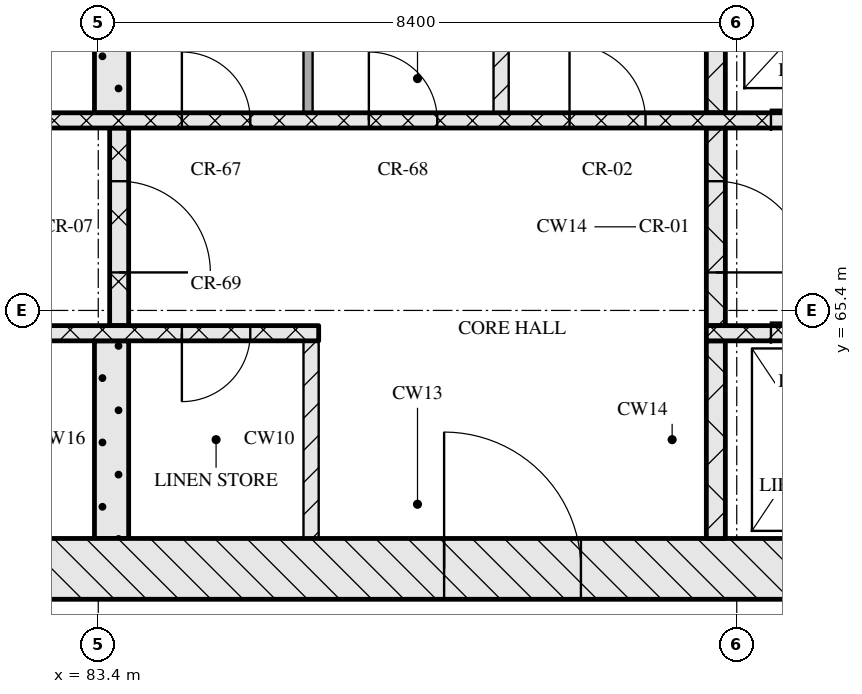
"""IFC4 building model, lengths in metres.
Left out: names, types, materials, properties, quantities, classifications, styles, units other than length and angle.
Written with IfcOpenShell. Run it as: python <this file> out.ifc"""

import sys

from ifc_helpers import new_model, si_unit, direction, frame, frame_2d, origin, place, context, subcontext, project, spatial, rectangle, extrude, element, fill, save


model = new_model("IFC4")
c1 = context("Model", 3, precision=1e-05, world=origin(), true_north=direction((0.0, 1.0)))
c2 = subcontext(c1, "Body", "Model", "MODEL_VIEW")
j1 = project(units=[si_unit("LENGTHUNIT", "METRE"), si_unit("PLANEANGLEUNIT", "RADIAN")], contexts=[c1])
p1 = place(None, origin())
s1 = spatial("IfcSite", under=j1, at=p1, CompositionType="ELEMENT")
p2 = place(p1, origin())
s2 = spatial("IfcBuilding", under=s1, at=p2, CompositionType="ELEMENT")
p3 = place(p2, frame((0.0, 0.0, 183.45)))
s3 = spatial("IfcBuildingStorey", under=s2, at=p3, CompositionType="ELEMENT", Elevation=183.45)
p4 = place(p3, frame((67.0, 62.0, 0.0), z_axis=(0.0, 0.0, 1.0), x_axis=(1.0, 0.0, 0.0)))
e1 = element("IfcWall", 1, at=p4, inside=s3, PredefinedType="SOLIDWALL", context=c2, shape_type="SweptSolid", body=[
    extrude(rectangle(XDim=41.2, YDim=0.8, at=frame_2d((20.6, 0.0))), origin(), (0.0, 0.0, 1.0), 3.32),
])
p5 = place(p4, frame((20.95, 0.0, 0.0)))
e2 = element("IfcOpeningElement", 2, at=p5, cuts=e1, PredefinedType="OPENING", context=c2, shape_type="SweptSolid", body=[
    extrude(rectangle(XDim=1.8, YDim=2.1, at=frame_2d((0.9, 1.05))), frame((0.0, 0.41, 0.0), z_axis=(0.0, -1.0, 0.0), x_axis=(1.0, 0.0, 0.0)), (0.0, 0.0, 1.0), 0.82),
])
p6 = place(p3, frame((83.575, 62.4, 0.0), z_axis=(0.0, 0.0, 1.0), x_axis=(0.0, 1.0, 0.0)))
e3 = element("IfcWall", 3, at=p6, inside=s3, PredefinedType="SOLIDWALL", context=c2, shape_type="SweptSolid", body=[
    extrude(rectangle(XDim=2.6, YDim=0.45, at=frame_2d((1.3, 0.0))), origin(), (0.0, 0.0, 1.0), 3.32),
])
p7 = place(p3, frame((86.2, 62.4, 0.0), z_axis=(0.0, 0.0, 1.0), x_axis=(0.0, 1.0, 0.0)))
e4 = element("IfcWall", 4, at=p7, inside=s3, PredefinedType="PARTITIONING", context=c2, shape_type="SweptSolid", body=[
    extrude(rectangle(XDim=2.6, YDim=0.2, at=frame_2d((1.3, 0.0))), origin(), (0.0, 0.0, 1.0), 3.32),
])
p8 = place(p3, frame((91.525, 62.4, 0.0), z_axis=(0.0, 0.0, 1.0), x_axis=(0.0, 1.0, 0.0)))
e5 = element("IfcWall", 5, at=p8, inside=s3, PredefinedType="SOLIDWALL", context=c2, shape_type="SweptSolid", body=[
    extrude(rectangle(XDim=2.6, YDim=0.25, at=frame_2d((1.3, 0.0))), origin(), (0.0, 0.0, 1.0), 3.32),
])
p9 = place(p3, frame((67.8, 65.1, 0.0), z_axis=(0.0, 0.0, 1.0), x_axis=(1.0, 0.0, 0.0)))
e6 = element("IfcWall", 6, at=p9, inside=s3, PredefinedType="SOLIDWALL", context=c2, shape_type="SweptSolid", body=[
    extrude(rectangle(XDim=18.5, YDim=0.2, at=frame_2d((9.25, 0.0))), origin(), (0.0, 0.0, 1.0), 3.32),
])
p10 = place(p9, frame((7.27, 0.0, 0.0)))
e7 = element("IfcOpeningElement", 7, at=p10, cuts=e6, PredefinedType="OPENING", context=c2, shape_type="SweptSolid", body=[
    extrude(rectangle(XDim=0.9, YDim=2.1, at=frame_2d((0.45, 1.05))), frame((0.0, 0.11, 0.0), z_axis=(0.0, -1.0, 0.0), x_axis=(1.0, 0.0, 0.0)), (0.0, 0.0, 1.0), 0.22),
])
p11 = place(p9, frame((9.65, 0.0, 0.0)))
e8 = element("IfcOpeningElement", 8, at=p11, cuts=e6, PredefinedType="OPENING", context=c2, shape_type="SweptSolid", body=[
    extrude(rectangle(XDim=0.9, YDim=2.1, at=frame_2d((0.45, 1.05))), frame((0.0, 0.11, 0.0), z_axis=(0.0, -1.0, 0.0), x_axis=(1.0, 0.0, 0.0)), (0.0, 0.0, 1.0), 0.22),
])
p12 = place(p9, frame((13.36, 0.0, 0.0)))
e9 = element("IfcOpeningElement", 9, at=p12, cuts=e6, PredefinedType="OPENING", context=c2, shape_type="SweptSolid", body=[
    extrude(rectangle(XDim=0.9, YDim=2.1, at=frame_2d((0.45, 1.05))), frame((0.0, 0.11, 0.0), z_axis=(0.0, -1.0, 0.0), x_axis=(1.0, 0.0, 0.0)), (0.0, 0.0, 1.0), 0.22),
])
p13 = place(p9, frame((16.7, 0.0, 0.0)))
e10 = element("IfcOpeningElement", 10, at=p13, cuts=e6, PredefinedType="OPENING", context=c2, shape_type="SweptSolid", body=[
    extrude(rectangle(XDim=0.9, YDim=2.1, at=frame_2d((0.45, 1.05))), frame((0.0, 0.11, 0.0), z_axis=(0.0, -1.0, 0.0), x_axis=(1.0, 0.0, 0.0)), (0.0, 0.0, 1.0), 0.22),
])
p14 = place(p3, frame((91.4, 65.1, 0.0), z_axis=(0.0, 0.0, 1.0), x_axis=(1.0, 0.0, 0.0)))
e11 = element("IfcWall", 11, at=p14, inside=s3, PredefinedType="SOLIDWALL", context=c2, shape_type="SweptSolid", body=[
    extrude(rectangle(XDim=16.0, YDim=0.2, at=frame_2d((8.0, 0.0))), origin(), (0.0, 0.0, 1.0), 3.32),
])
p15 = place(p14, frame((0.85, 0.0, 0.0)))
e12 = element("IfcOpeningElement", 12, at=p15, cuts=e11, PredefinedType="OPENING", context=c2, shape_type="SweptSolid", body=[
    extrude(rectangle(XDim=1.1, YDim=2.1, at=frame_2d((0.55, 1.05))), frame((0.0, 0.11, 0.0), z_axis=(0.0, -1.0, 0.0), x_axis=(1.0, 0.0, 0.0)), (0.0, 0.0, 1.0), 0.22),
])
p16 = place(p14, frame((3.35, 0.0, 0.0)))
e13 = element("IfcOpeningElement", 13, at=p16, cuts=e11, PredefinedType="OPENING", context=c2, shape_type="SweptSolid", body=[
    extrude(rectangle(XDim=1.1, YDim=2.1, at=frame_2d((0.55, 1.05))), frame((0.0, 0.11, 0.0), z_axis=(0.0, -1.0, 0.0), x_axis=(1.0, 0.0, 0.0)), (0.0, 0.0, 1.0), 0.22),
])
p17 = place(p14, frame((5.85, 0.0, 0.0)))
e14 = element("IfcOpeningElement", 14, at=p17, cuts=e11, PredefinedType="OPENING", context=c2, shape_type="SweptSolid", body=[
    extrude(rectangle(XDim=1.1, YDim=2.1, at=frame_2d((0.55, 1.05))), frame((0.0, 0.11, 0.0), z_axis=(0.0, -1.0, 0.0), x_axis=(1.0, 0.0, 0.0)), (0.0, 0.0, 1.0), 0.22),
])
p18 = place(p14, frame((7.83, 0.0, 0.0)))
e15 = element("IfcOpeningElement", 15, at=p18, cuts=e11, PredefinedType="OPENING", context=c2, shape_type="SweptSolid", body=[
    extrude(rectangle(XDim=0.9, YDim=2.1, at=frame_2d((0.45, 1.05))), frame((0.0, 0.11, 0.0), z_axis=(0.0, -1.0, 0.0), x_axis=(1.0, 0.0, 0.0)), (0.0, 0.0, 1.0), 0.22),
])
p19 = place(p3, frame((83.675, 65.2, 0.0), z_axis=(0.0, 0.0, 1.0), x_axis=(0.0, 1.0, 0.0)))
e16 = element("IfcWall", 16, at=p19, inside=s3, PredefinedType="SOLIDWALL", context=c2, shape_type="SweptSolid", body=[
    extrude(rectangle(XDim=2.6, YDim=0.25, at=frame_2d((1.3, 0.0))), origin(), (0.0, 0.0, 1.0), 3.32),
])
p20 = place(p19, frame((0.7, 0.0, 0.0)))
e17 = element("IfcOpeningElement", 17, at=p20, cuts=e16, PredefinedType="OPENING", context=c2, shape_type="SweptSolid", body=[
    extrude(rectangle(XDim=1.2, YDim=2.1, at=frame_2d((0.6, 1.05))), frame((0.0, 0.135, 0.0), z_axis=(0.0, -1.0, 0.0), x_axis=(1.0, 0.0, 0.0)), (0.0, 0.0, 1.0), 0.27),
])
p21 = place(p3, frame((91.525, 65.2, 0.0), z_axis=(0.0, 0.0, 1.0), x_axis=(0.0, 1.0, 0.0)))
e18 = element("IfcWall", 18, at=p21, inside=s3, PredefinedType="SOLIDWALL", context=c2, shape_type="SweptSolid", body=[
    extrude(rectangle(XDim=2.6, YDim=0.25, at=frame_2d((1.3, 0.0))), origin(), (0.0, 0.0, 1.0), 3.32),
])
p22 = place(p21, frame((0.7, 0.0, 0.0)))
e19 = element("IfcOpeningElement", 19, at=p22, cuts=e18, PredefinedType="OPENING", context=c2, shape_type="SweptSolid", body=[
    extrude(rectangle(XDim=1.2, YDim=2.1, at=frame_2d((0.6, 1.05))), frame((0.0, 0.135, 0.0), z_axis=(0.0, -1.0, 0.0), x_axis=(1.0, 0.0, 0.0)), (0.0, 0.0, 1.0), 0.27),
])
p23 = place(p3, frame((76.05, 67.9, 0.0), z_axis=(0.0, 0.0, 1.0), x_axis=(1.0, 0.0, 0.0)))
e20 = element("IfcWall", 20, at=p23, inside=s3, PredefinedType="SOLIDWALL", context=c2, shape_type="SweptSolid", body=[
    extrude(rectangle(XDim=23.1, YDim=0.2, at=frame_2d((11.55, 0.0))), origin(), (0.0, 0.0, 1.0), 3.32),
])
p24 = place(p23, frame((0.75, 0.0, 0.0)))
e21 = element("IfcOpeningElement", 21, at=p24, cuts=e20, PredefinedType="OPENING", context=c2, shape_type="SweptSolid", body=[
    extrude(rectangle(XDim=0.9, YDim=2.1, at=frame_2d((0.45, 1.05))), frame((0.0, 0.11, 0.0), z_axis=(0.0, -1.0, 0.0), x_axis=(1.0, 0.0, 0.0)), (0.0, 0.0, 1.0), 0.22),
])
p25 = place(p23, frame((3.32, 0.0, 0.0)))
e22 = element("IfcOpeningElement", 22, at=p25, cuts=e20, PredefinedType="OPENING", context=c2, shape_type="SweptSolid", body=[
    extrude(rectangle(XDim=0.9, YDim=2.1, at=frame_2d((0.45, 1.05))), frame((0.0, 0.11, 0.0), z_axis=(0.0, -1.0, 0.0), x_axis=(1.0, 0.0, 0.0)), (0.0, 0.0, 1.0), 0.22),
])
p26 = place(p23, frame((5.77, 0.0, 0.0)))
e23 = element("IfcOpeningElement", 23, at=p26, cuts=e20, PredefinedType="OPENING", context=c2, shape_type="SweptSolid", body=[
    extrude(rectangle(XDim=0.9, YDim=2.1, at=frame_2d((0.45, 1.05))), frame((0.0, 0.11, 0.0), z_axis=(0.0, -1.0, 0.0), x_axis=(1.0, 0.0, 0.0)), (0.0, 0.0, 1.0), 0.22),
])
p27 = place(p23, frame((8.45, 0.0, 0.0)))
e24 = element("IfcOpeningElement", 24, at=p27, cuts=e20, PredefinedType="OPENING", context=c2, shape_type="SweptSolid", body=[
    extrude(rectangle(XDim=0.9, YDim=2.1, at=frame_2d((0.45, 1.05))), frame((0.0, 0.11, 0.0), z_axis=(0.0, -1.0, 0.0), x_axis=(1.0, 0.0, 0.0)), (0.0, 0.0, 1.0), 0.22),
])
p28 = place(p23, frame((10.91, 0.0, 0.0)))
e25 = element("IfcOpeningElement", 25, at=p28, cuts=e20, PredefinedType="OPENING", context=c2, shape_type="SweptSolid", body=[
    extrude(rectangle(XDim=0.9, YDim=2.1, at=frame_2d((0.45, 1.05))), frame((0.0, 0.11, 0.0), z_axis=(0.0, -1.0, 0.0), x_axis=(1.0, 0.0, 0.0)), (0.0, 0.0, 1.0), 0.22),
])
p29 = place(p23, frame((13.55, 0.0, 0.0)))
e26 = element("IfcOpeningElement", 26, at=p29, cuts=e20, PredefinedType="OPENING", context=c2, shape_type="SweptSolid", body=[
    extrude(rectangle(XDim=1.0, YDim=2.1, at=frame_2d((0.5, 1.05))), frame((0.0, 0.11, 0.0), z_axis=(0.0, -1.0, 0.0), x_axis=(1.0, 0.0, 0.0)), (0.0, 0.0, 1.0), 0.22),
])
p30 = place(p23, frame((16.2, 0.0, 0.0)))
e27 = element("IfcOpeningElement", 27, at=p30, cuts=e20, PredefinedType="OPENING", context=c2, shape_type="SweptSolid", body=[
    extrude(rectangle(XDim=1.1, YDim=2.1, at=frame_2d((0.55, 1.05))), frame((0.0, 0.11, 0.0), z_axis=(0.0, -1.0, 0.0), x_axis=(1.0, 0.0, 0.0)), (0.0, 0.0, 1.0), 0.22),
])
p31 = place(p23, frame((18.7, 0.0, 0.0)))
e28 = element("IfcOpeningElement", 28, at=p31, cuts=e20, PredefinedType="OPENING", context=c2, shape_type="SweptSolid", body=[
    extrude(rectangle(XDim=1.1, YDim=2.1, at=frame_2d((0.55, 1.05))), frame((0.0, 0.11, 0.0), z_axis=(0.0, -1.0, 0.0), x_axis=(1.0, 0.0, 0.0)), (0.0, 0.0, 1.0), 0.22),
])
p32 = place(p23, frame((21.2, 0.0, 0.0)))
e29 = element("IfcOpeningElement", 29, at=p32, cuts=e20, PredefinedType="OPENING", context=c2, shape_type="SweptSolid", body=[
    extrude(rectangle(XDim=1.1, YDim=2.1, at=frame_2d((0.55, 1.05))), frame((0.0, 0.11, 0.0), z_axis=(0.0, -1.0, 0.0), x_axis=(1.0, 0.0, 0.0)), (0.0, 0.0, 1.0), 0.22),
])
p33 = place(p3, frame((83.575, 68.0, 0.0), z_axis=(0.0, 0.0, 1.0), x_axis=(0.0, 1.0, 0.0)))
e30 = element("IfcWall", 30, at=p33, inside=s3, PredefinedType="SOLIDWALL", context=c2, shape_type="SweptSolid", body=[
    extrude(rectangle(XDim=2.6, YDim=0.45, at=frame_2d((1.3, 0.0))), origin(), (0.0, 0.0, 1.0), 3.32),
])
p34 = place(p3, frame((86.16, 68.0, 0.0), z_axis=(0.0, 0.0, 1.0), x_axis=(0.0, 1.0, 0.0)))
e31 = element("IfcWall", 31, at=p34, inside=s3, PredefinedType="PARTITIONING", context=c2, shape_type="SweptSolid", body=[
    extrude(rectangle(XDim=2.6, YDim=0.12, at=frame_2d((1.3, 0.0))), origin(), (0.0, 0.0, 1.0), 3.32),
])
p35 = place(p3, frame((88.7, 68.0, 0.0), z_axis=(0.0, 0.0, 1.0), x_axis=(0.0, 1.0, 0.0)))
e32 = element("IfcWall", 32, at=p35, inside=s3, PredefinedType="PARTITIONING", context=c2, shape_type="SweptSolid", body=[
    extrude(rectangle(XDim=2.6, YDim=0.2, at=frame_2d((1.3, 0.0))), origin(), (0.0, 0.0, 1.0), 3.32),
])
p36 = place(p3, frame((91.525, 68.0, 0.0), z_axis=(0.0, 0.0, 1.0), x_axis=(0.0, 1.0, 0.0)))
e33 = element("IfcWall", 33, at=p36, inside=s3, PredefinedType="SOLIDWALL", context=c2, shape_type="SweptSolid", body=[
    extrude(rectangle(XDim=2.6, YDim=0.25, at=frame_2d((1.3, 0.0))), origin(), (0.0, 0.0, 1.0), 3.32),
])
p37 = place(p5, origin())
e34 = element("IfcDoor", 34, at=p37, inside=s3, OperationType="DOUBLE_DOOR_SINGLE_SWING", PredefinedType="DOOR", context=c2, shape_type="SweptSolid", body=[
    extrude(rectangle(XDim=1.8, YDim=2.1, at=frame_2d((0.9, 1.05))), frame((0.0, 0.025, 0.0), z_axis=(0.0, -1.0, 0.0), x_axis=(1.0, 0.0, 0.0)), (0.0, 0.0, 1.0), 0.05),
])
fill(e2, e34)
p38 = place(p13, origin())
e35 = element("IfcDoor", 35, at=p38, inside=s3, OperationType="SINGLE_SWING_RIGHT", PredefinedType="DOOR", context=c2, shape_type="SweptSolid", body=[
    extrude(rectangle(XDim=0.9, YDim=2.1, at=frame_2d((0.45, 1.05))), frame((0.0, 0.025, 0.0), z_axis=(0.0, -1.0, 0.0), x_axis=(1.0, 0.0, 0.0)), (0.0, 0.0, 1.0), 0.05),
])
fill(e10, e35)
p39 = place(p15, origin())
e36 = element("IfcDoor", 36, at=p39, inside=s3, OperationType="SLIDING_TO_LEFT", PredefinedType="DOOR", context=c2, shape_type="SweptSolid", body=[
    extrude(rectangle(XDim=1.1, YDim=2.1, at=frame_2d((0.55, 1.05))), frame((0.0, 0.025, 0.0), z_axis=(0.0, -1.0, 0.0), x_axis=(1.0, 0.0, 0.0)), (0.0, 0.0, 1.0), 0.05),
])
fill(e12, e36)
p40 = place(p20, origin())
e37 = element("IfcDoor", 37, at=p40, inside=s3, OperationType="SINGLE_SWING_RIGHT", PredefinedType="DOOR", context=c2, shape_type="SweptSolid", body=[
    extrude(rectangle(XDim=1.2, YDim=2.1, at=frame_2d((0.6, 1.05))), frame((0.0, 0.025, 0.0), z_axis=(0.0, -1.0, 0.0), x_axis=(1.0, 0.0, 0.0)), (0.0, 0.0, 1.0), 0.05),
])
fill(e17, e37)
p41 = place(p22, origin())
e38 = element("IfcDoor", 38, at=p41, inside=s3, OperationType="SINGLE_SWING_RIGHT", PredefinedType="DOOR", context=c2, shape_type="SweptSolid", body=[
    extrude(rectangle(XDim=1.2, YDim=2.1, at=frame_2d((0.6, 1.05))), frame((0.0, 0.025, 0.0), z_axis=(0.0, -1.0, 0.0), x_axis=(1.0, 0.0, 0.0)), (0.0, 0.0, 1.0), 0.05),
])
fill(e19, e38)
p42 = place(p27, origin())
e39 = element("IfcDoor", 39, at=p42, inside=s3, OperationType="SINGLE_SWING_LEFT", PredefinedType="DOOR", context=c2, shape_type="SweptSolid", body=[
    extrude(rectangle(XDim=0.9, YDim=2.1, at=frame_2d((0.45, 1.05))), frame((0.0, 0.025, 0.0), z_axis=(0.0, -1.0, 0.0), x_axis=(1.0, 0.0, 0.0)), (0.0, 0.0, 1.0), 0.05),
])
fill(e24, e39)
p43 = place(p28, origin())
e40 = element("IfcDoor", 40, at=p43, inside=s3, OperationType="SINGLE_SWING_LEFT", PredefinedType="DOOR", context=c2, shape_type="SweptSolid", body=[
    extrude(rectangle(XDim=0.9, YDim=2.1, at=frame_2d((0.45, 1.05))), frame((0.0, 0.025, 0.0), z_axis=(0.0, -1.0, 0.0), x_axis=(1.0, 0.0, 0.0)), (0.0, 0.0, 1.0), 0.05),
])
fill(e25, e40)
p44 = place(p29, origin())
e41 = element("IfcDoor", 41, at=p44, inside=s3, OperationType="SINGLE_SWING_LEFT", PredefinedType="DOOR", context=c2, shape_type="SweptSolid", body=[
    extrude(rectangle(XDim=1.0, YDim=2.1, at=frame_2d((0.5, 1.05))), frame((0.0, 0.025, 0.0), z_axis=(0.0, -1.0, 0.0), x_axis=(1.0, 0.0, 0.0)), (0.0, 0.0, 1.0), 0.05),
])
fill(e26, e41)
p45 = place(p30, origin())
e42 = element("IfcDoor", 42, at=p45, inside=s3, OperationType="SLIDING_TO_RIGHT", PredefinedType="DOOR", context=c2, shape_type="SweptSolid", body=[
    extrude(rectangle(XDim=1.1, YDim=2.1, at=frame_2d((0.55, 1.05))), frame((0.0, 0.025, 0.0), z_axis=(0.0, -1.0, 0.0), x_axis=(1.0, 0.0, 0.0)), (0.0, 0.0, 1.0), 0.05),
])
fill(e27, e42)
save(model, sys.argv[1])
